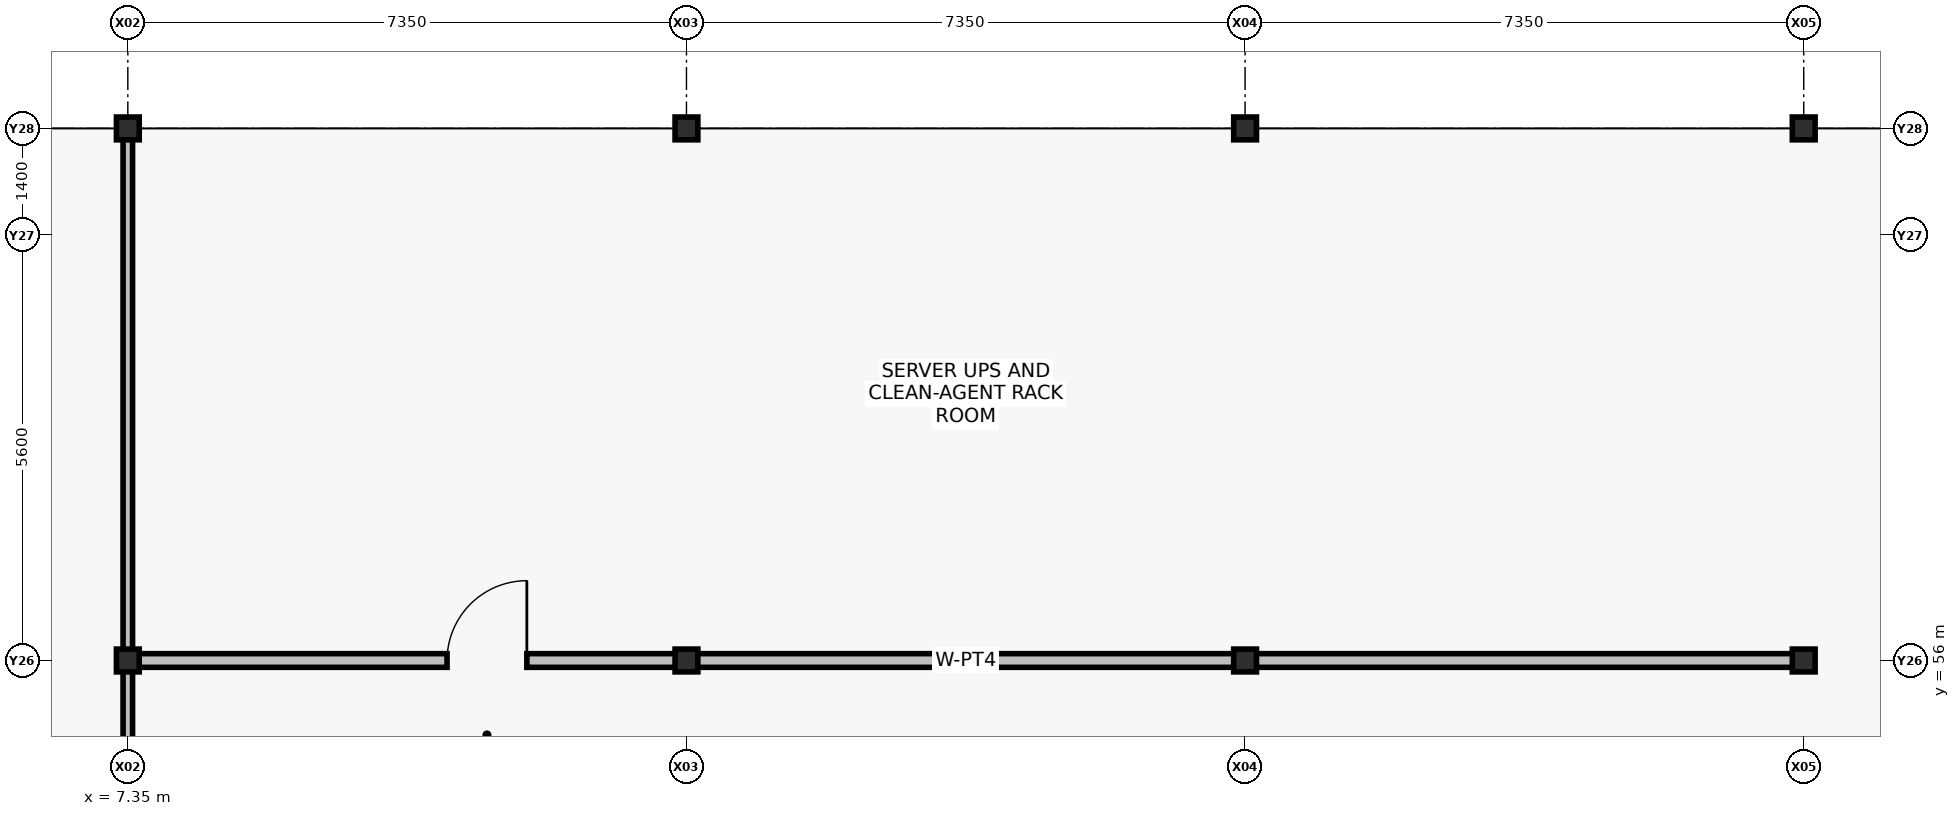
"""IFC4 building model, lengths in metres.
Left out: names, types, materials, properties, quantities, classifications, styles, units other than length and angle.
Written with IfcOpenShell. Run it as: python <this file> out.ifc"""

import sys

from ifc_helpers import new_model, si_unit, direction, frame, frame_2d, origin, origin_2d, place, context, subcontext, project, spatial, rectangle, i_section, extrude, element, fill, save


model = new_model("IFC4")
c1 = context("Model", 3, precision=1e-05, world=origin(), true_north=direction((0.0, 1.0)))
c2 = subcontext(c1, "Body", "Model", "MODEL_VIEW")
j1 = project(units=[si_unit("LENGTHUNIT", "METRE"), si_unit("PLANEANGLEUNIT", "RADIAN")], contexts=[c1])
p1 = place(None, origin())
s1 = spatial("IfcSite", under=j1, at=p1, CompositionType="ELEMENT")
p2 = place(p1, origin())
s2 = spatial("IfcBuilding", under=s1, at=p2, CompositionType="ELEMENT")
p3 = place(p2, frame((0.0, 0.0, 11.1)))
s3 = spatial("IfcBuildingStorey", under=s2, at=p3, CompositionType="ELEMENT", Elevation=11.1)
for number, where, z_axis, x_axis in (
    (1, (7.35, 56.0, 0.0), (0.0, 0.0, 1.0), (1.0, 0.0, 0.0)),
    (2, (7.35, 63.0, 0.0), (0.0, 0.0, 1.0), (1.0, 0.0, 0.0)),
    (3, (14.7, 56.0, 0.0), (0.0, 0.0, 1.0), (1.0, 0.0, 0.0)),
    (4, (14.7, 63.0, 0.0), (0.0, 0.0, 1.0), (1.0, 0.0, 0.0)),
    (5, (22.05, 56.0, 0.0), (0.0, 0.0, 1.0), (1.0, 0.0, 0.0)),
    (6, (22.05, 63.0, 0.0), (0.0, 0.0, 1.0), (1.0, 0.0, 0.0)),
    (7, (29.4, 56.0, 0.0), (0.0, 0.0, 1.0), (1.0, 0.0, 0.0)),
    (8, (29.4, 63.0, 0.0), (0.0, 0.0, 1.0), (1.0, 0.0, 0.0)),
):
    element("IfcColumn", number, at=place(p3, frame(where, z_axis=z_axis, x_axis=x_axis)), inside=s3, PredefinedType="COLUMN", context=c2, shape_type="SweptSolid", body=[
        extrude(i_section(OverallWidth=0.3, OverallDepth=0.3, WebThickness=0.01, FlangeThickness=0.015, at=origin_2d()), origin(), (0.0, 0.0, 1.0), 4.2),
    ])
p4 = place(p3, frame((7.35, 35.0, 0.0), z_axis=(0.0, 0.0, 1.0), x_axis=(0.0, 1.0, 0.0)))
e9 = element("IfcWall", 9, at=p4, inside=s3, PredefinedType="PARTITIONING", context=c2, shape_type="SweptSolid", body=[
    extrude(rectangle(XDim=28.0, YDim=0.125, at=frame_2d((14.0, 0.0))), origin(), (0.0, 0.0, 1.0), 3.15),
])
p5 = place(p4, frame((4.0, 0.0, 0.0)))
e10 = element("IfcOpeningElement", 10, at=p5, cuts=e9, PredefinedType="OPENING", context=c2, shape_type="SweptSolid", body=[
    extrude(rectangle(XDim=0.9, YDim=2.1, at=frame_2d((0.45, 1.05))), frame((0.0, 0.072, 0.0), z_axis=(0.0, -1.0, 0.0), x_axis=(1.0, 0.0, 0.0)), (0.0, 0.0, 1.0), 0.145),
])
p6 = place(p4, frame((11.0, 0.0, 0.0)))
e11 = element("IfcOpeningElement", 11, at=p6, cuts=e9, PredefinedType="OPENING", context=c2, shape_type="SweptSolid", body=[
    extrude(rectangle(XDim=0.95, YDim=2.2, at=frame_2d((0.475, 1.1))), frame((0.0, 0.072, 0.0), z_axis=(0.0, -1.0, 0.0), x_axis=(1.0, 0.0, 0.0)), (0.0, 0.0, 1.0), 0.145),
])
p7 = place(p3, frame((7.35, 56.0, 0.0), z_axis=(0.0, 0.0, 1.0), x_axis=(1.0, 0.0, 0.0)))
e12 = element("IfcWall", 12, at=p7, inside=s3, PredefinedType="PARTITIONING", context=c2, shape_type="SweptSolid", body=[
    extrude(rectangle(XDim=22.05, YDim=0.18, at=frame_2d((11.025, 0.0))), origin(), (0.0, 0.0, 1.0), 3.15),
])
p8 = place(p7, frame((4.2, 0.0, 0.0)))
e13 = element("IfcOpeningElement", 13, at=p8, cuts=e12, PredefinedType="OPENING", context=c2, shape_type="SweptSolid", body=[
    extrude(rectangle(XDim=1.05, YDim=2.15, at=frame_2d((0.525, 1.075))), frame((0.0, 0.1, 0.0), z_axis=(0.0, -1.0, 0.0), x_axis=(1.0, 0.0, 0.0)), (0.0, 0.0, 1.0), 0.2),
])
p9 = place(p8, origin())
e14 = element("IfcDoor", 14, at=p9, inside=s3, OperationType="SINGLE_SWING_RIGHT", PredefinedType="DOOR", context=c2, shape_type="SweptSolid", body=[
    extrude(rectangle(XDim=1.05, YDim=2.15, at=frame_2d((0.525, 1.075))), frame((0.0, 0.025, 0.0), z_axis=(0.0, -1.0, 0.0), x_axis=(1.0, 0.0, 0.0)), (0.0, 0.0, 1.0), 0.05),
])
fill(e13, e14)
save(model, sys.argv[1])
